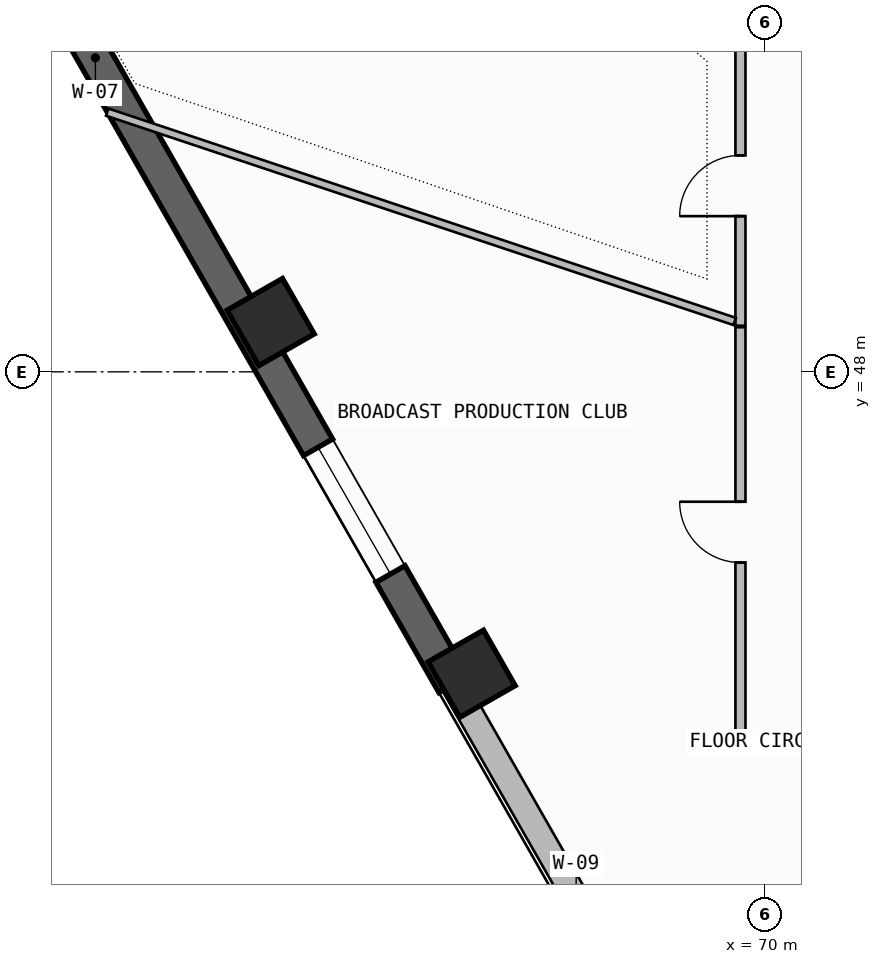
"""IFC4 building model, lengths in metres.
Left out: names, types, materials, properties, quantities, classifications, styles, units other than length and angle.
Written with IfcOpenShell. Run it as: python <this file> out.ifc"""

import sys

from ifc_helpers import new_model, si_unit, direction, frame, frame_2d, origin, origin_2d, place, context, subcontext, project, spatial, rectangle, extrude, element, fill, save


model = new_model("IFC4")
c1 = context("Model", 3, precision=1e-05, world=origin(), true_north=direction((0.0, 1.0)))
c2 = subcontext(c1, "Body", "Model", "MODEL_VIEW")
j1 = project(units=[si_unit("LENGTHUNIT", "METRE"), si_unit("PLANEANGLEUNIT", "RADIAN")], contexts=[c1])
p1 = place(None, origin())
s1 = spatial("IfcSite", under=j1, at=p1, CompositionType="ELEMENT")
p2 = place(p1, origin())
s2 = spatial("IfcBuilding", under=s1, at=p2, CompositionType="ELEMENT")
p3 = place(p2, frame((0.0, 0.0, 200.9)))
s3 = spatial("IfcBuildingStorey", under=s2, at=p3, CompositionType="ELEMENT", Elevation=200.9)
for number, where, z_axis, x_axis in (
    (1, (61.868, 48.818, 0.0), (0.0, 0.0, 1.0), (-0.496, 0.868, 0.0)),
    (2, (65.173, 43.035, 0.0), (0.0, 0.0, 1.0), (-0.496, 0.868, 0.0)),
):
    element("IfcColumn", number, at=place(p3, frame(where, z_axis=z_axis, x_axis=x_axis)), inside=s3, PredefinedType="COLUMN", context=c2, shape_type="SweptSolid", body=[
        extrude(rectangle(XDim=1.05, YDim=1.05, at=origin_2d()), origin(), (0.0, 0.0, 1.0), 3.52),
    ])
p4 = place(p3, frame((55.325, 59.57, -0.4), z_axis=(0.0, 0.0, 1.0), x_axis=(0.496211351597, -0.868201759124, 0.0)))
e3 = element("IfcWall", 3, at=p4, inside=s3, PredefinedType="SHEAR", context=c2, shape_type="SweptSolid", body=[
    extrude(rectangle(XDim=19.243, YDim=0.55, at=frame_2d((9.622, 0.0))), origin(), (0.0, 0.0, 1.0), 3.66),
])
p5 = place(p4, frame((14.757, 0.0, 1.1)))
e4 = element("IfcOpeningElement", 4, at=p5, cuts=e3, PredefinedType="OPENING", context=c2, shape_type="SweptSolid", body=[
    extrude(rectangle(XDim=2.4, YDim=1.2, at=frame_2d((1.2, 0.6))), frame((0.0, 0.285, 0.0), z_axis=(0.0, -1.0, 0.0), x_axis=(1.0, 0.0, 0.0)), (0.0, 0.0, 1.0), 0.57),
])
p6 = place(p3, frame((64.874, 42.864, 0.0), z_axis=(0.0, 0.0, 1.0), x_axis=(0.49622043329, -0.868196568517, 0.0)))
e5 = element("IfcWall", 5, at=p6, inside=s3, PredefinedType="SOLIDWALL", context=c2, shape_type="SweptSolid", body=[
    extrude(rectangle(XDim=12.582, YDim=0.42, at=frame_2d((6.291, 0.0))), origin(), (0.0, 0.0, 1.0), 2.645),
])
p7 = place(p6, frame((8.136, 0.0, 1.1)))
e6 = element("IfcOpeningElement", 6, at=p7, cuts=e5, PredefinedType="OPENING", context=c2, shape_type="SweptSolid", body=[
    extrude(rectangle(XDim=2.4, YDim=1.2, at=frame_2d((1.2, 0.6))), frame((0.0, 0.22, 0.0), z_axis=(0.0, -1.0, 0.0), x_axis=(1.0, 0.0, 0.0)), (0.0, 0.0, 1.0), 0.44),
])
p8 = place(p3, frame((69.594, 53.362, 0.0), z_axis=(0.0, 0.0, 1.0), x_axis=(0.0, -1.0, 0.0)))
e7 = element("IfcWall", 7, at=p8, inside=s3, PredefinedType="PARTITIONING", context=c2, shape_type="SweptSolid", body=[
    extrude(rectangle(XDim=4.604, YDim=0.165, at=frame_2d((2.302, 0.0))), origin(), (0.0, 0.0, 1.0), 2.745),
])
p9 = place(p8, frame((1.802, 0.0, 0.0)))
e8 = element("IfcOpeningElement", 8, at=p9, cuts=e7, PredefinedType="OPENING", context=c2, shape_type="SweptSolid", body=[
    extrude(rectangle(XDim=1.0, YDim=2.2, at=frame_2d((0.5, 1.1))), frame((0.0, 0.093, 0.0), z_axis=(0.0, -1.0, 0.0), x_axis=(1.0, 0.0, 0.0)), (0.0, 0.0, 1.0), 0.185),
])
p10 = place(p3, frame((69.5, 48.828, 0.0), z_axis=(0.0, 0.0, 1.0), x_axis=(-0.948600230004, 0.31647686114, 0.0)))
e9 = element("IfcWall", 9, at=p10, inside=s3, PredefinedType="PARTITIONING", context=c2, shape_type="SweptSolid", body=[
    extrude(rectangle(XDim=10.879, YDim=0.125, at=frame_2d((5.439, 0.0))), origin(), (0.0, 0.0, 1.0), 2.645),
])
p11 = place(p3, frame((69.594, 48.733, 0.0), z_axis=(0.0, 0.0, 1.0), x_axis=(0.0, -1.0, 0.0)))
e10 = element("IfcWall", 10, at=p11, inside=s3, PredefinedType="PARTITIONING", context=c2, shape_type="SweptSolid", body=[
    extrude(rectangle(XDim=6.739, YDim=0.165, at=frame_2d((3.37, 0.0))), origin(), (0.0, 0.0, 1.0), 3.26),
])
p12 = place(p11, frame((2.869, 0.0, 0.0)))
e11 = element("IfcOpeningElement", 11, at=p12, cuts=e10, PredefinedType="OPENING", context=c2, shape_type="SweptSolid", body=[
    extrude(rectangle(XDim=1.0, YDim=2.2, at=frame_2d((0.5, 1.1))), frame((0.0, 0.093, 0.0), z_axis=(0.0, -1.0, 0.0), x_axis=(1.0, 0.0, 0.0)), (0.0, 0.0, 1.0), 0.185),
])
p13 = place(p5, origin())
e12 = element("IfcWindow", 12, at=p13, inside=s3, PartitioningType="SINGLE_PANEL", PredefinedType="WINDOW", context=c2, shape_type="SweptSolid", body=[
    extrude(rectangle(XDim=2.4, YDim=1.2, at=frame_2d((1.2, 0.6))), frame((0.0, 0.03, 0.0), z_axis=(0.0, -1.0, 0.0), x_axis=(1.0, 0.0, 0.0)), (0.0, 0.0, 1.0), 0.06),
])
fill(e4, e12)
p14 = place(p9, frame((1.0, 0.0, 0.0), z_axis=(0.0, 0.0, 1.0), x_axis=(-1.0, 0.0, 0.0)))
e13 = element("IfcDoor", 13, at=p14, inside=s3, OperationType="SINGLE_SWING_LEFT", PredefinedType="DOOR", context=c2, shape_type="SweptSolid", body=[
    extrude(rectangle(XDim=1.0, YDim=2.2, at=frame_2d((0.5, 1.1))), frame((0.0, 0.025, 0.0), z_axis=(0.0, -1.0, 0.0), x_axis=(1.0, 0.0, 0.0)), (0.0, 0.0, 1.0), 0.05),
])
fill(e8, e13)
p15 = place(p12, frame((1.0, 0.0, 0.0), z_axis=(0.0, 0.0, 1.0), x_axis=(-1.0, 0.0, 0.0)))
e14 = element("IfcDoor", 14, at=p15, inside=s3, OperationType="SINGLE_SWING_RIGHT", PredefinedType="DOOR", context=c2, shape_type="SweptSolid", body=[
    extrude(rectangle(XDim=1.0, YDim=2.2, at=frame_2d((0.5, 1.1))), frame((0.0, 0.025, 0.0), z_axis=(0.0, -1.0, 0.0), x_axis=(1.0, 0.0, 0.0)), (0.0, 0.0, 1.0), 0.05),
])
fill(e11, e14)
save(model, sys.argv[1])
